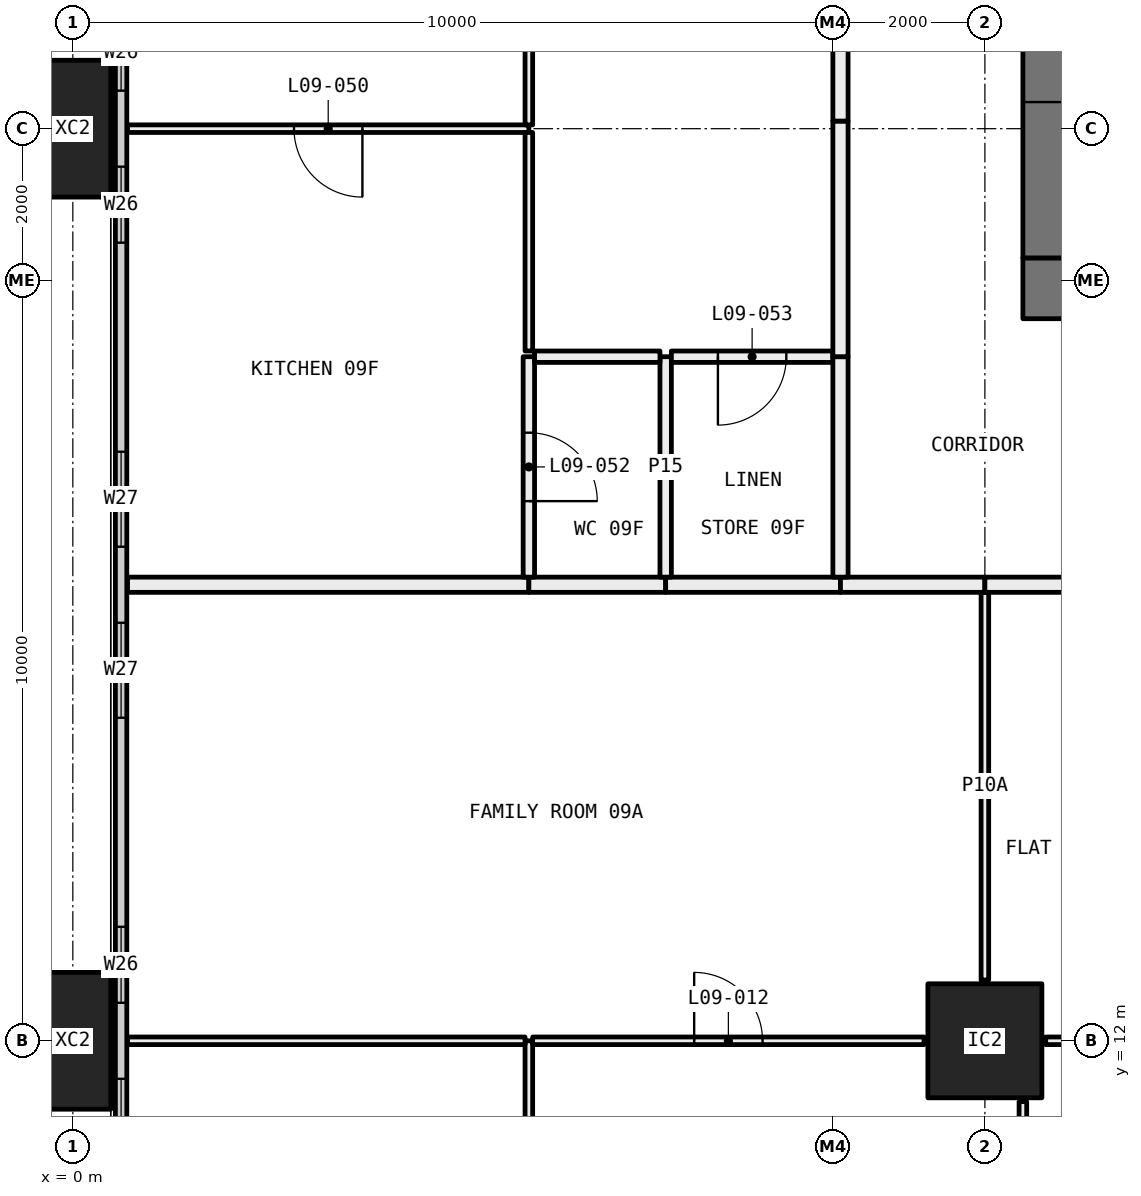
"""IFC4 building model, lengths in metres.
Left out: names, types, materials, properties, quantities, classifications, styles, units other than length and angle.
Written with IfcOpenShell. Run it as: python <this file> out.ifc"""

import sys

from ifc_helpers import new_model, si_unit, direction, frame, frame_2d, origin, origin_2d, place, context, subcontext, project, spatial, rectangle, hollow_rectangle, extrude, element, fill, save


model = new_model("IFC4")
c1 = context("Model", 3, precision=1e-05, world=origin(), true_north=direction((0.0, 1.0)))
c2 = subcontext(c1, "Body", "Model", "MODEL_VIEW")
j1 = project(units=[si_unit("LENGTHUNIT", "METRE"), si_unit("PLANEANGLEUNIT", "RADIAN")], contexts=[c1])
p1 = place(None, origin())
s1 = spatial("IfcSite", under=j1, at=p1, CompositionType="ELEMENT")
p2 = place(p1, origin())
s2 = spatial("IfcBuilding", under=s1, at=p2, CompositionType="ELEMENT")
p3 = place(p2, frame((0.0, 0.0, 43.8)))
s3 = spatial("IfcBuildingStorey", under=s2, at=p3, CompositionType="ELEMENT", Elevation=43.8)
for number, where, z_axis, x_axis in (
    (1, (0.0, 12.0, -0.4), (0.0, 0.0, 1.0), (0.0, 1.0, 0.0)),
    (2, (0.0, 24.0, -0.4), (0.0, 0.0, 1.0), (0.0, 1.0, 0.0)),
):
    element("IfcColumn", number, at=place(p3, frame(where, z_axis=z_axis, x_axis=x_axis)), inside=s3, PredefinedType="COLUMN", context=c2, shape_type="SweptSolid", body=[
        extrude(hollow_rectangle(XDim=1.8, YDim=1.0, WallThickness=0.07, at=origin_2d()), origin(), (0.0, 0.0, 1.0), 3.45),
    ])
p4 = place(p3, frame((12.0, 12.0, 0.0), z_axis=(0.0, 0.0, 1.0), x_axis=(1.0, 0.0, 0.0)))
e3 = element("IfcColumn", 3, at=p4, inside=s3, PredefinedType="COLUMN", context=c2, shape_type="SweptSolid", body=[
    extrude(hollow_rectangle(XDim=1.5, YDim=1.5, WallThickness=0.065, at=origin_2d()), origin(), (0.0, 0.0, 1.0), 3.05),
])
p5 = place(p3, frame((0.635, 6.71, 0.0), z_axis=(0.0, 0.0, 1.0), x_axis=(0.0, 1.0, 0.0)))
e4 = element("IfcWall", 4, at=p5, inside=s3, PredefinedType="ELEMENTEDWALL", context=c2, shape_type="SweptSolid", body=[
    extrude(rectangle(XDim=34.58, YDim=0.15, at=frame_2d((17.29, 0.0))), origin(), (0.0, 0.0, 1.0), 3.05),
])
p6 = place(p5, frame((0.29, 0.0, 0.45)))
e5 = element("IfcOpeningElement", 5, at=p6, cuts=e4, PredefinedType="OPENING", context=c2, shape_type="SweptSolid", body=[
    extrude(rectangle(XDim=4.5, YDim=2.55, at=frame_2d((2.25, 1.275))), frame((0.0, 0.085, 0.0), z_axis=(0.0, -1.0, 0.0), x_axis=(1.0, 0.0, 0.0)), (0.0, 0.0, 1.0), 0.17),
])
p7 = place(p5, frame((5.79, 0.0, 0.45)))
e6 = element("IfcOpeningElement", 6, at=p7, cuts=e4, PredefinedType="OPENING", context=c2, shape_type="SweptSolid", body=[
    extrude(rectangle(XDim=1.0, YDim=2.55, at=frame_2d((0.5, 1.275))), frame((0.0, 0.085, 0.0), z_axis=(0.0, -1.0, 0.0), x_axis=(1.0, 0.0, 0.0)), (0.0, 0.0, 1.0), 0.17),
])
p8 = place(p5, frame((9.54, 0.0, 0.45)))
e7 = element("IfcOpeningElement", 7, at=p8, cuts=e4, PredefinedType="OPENING", context=c2, shape_type="SweptSolid", body=[
    extrude(rectangle(XDim=1.25, YDim=2.55, at=frame_2d((0.625, 1.275))), frame((0.0, 0.085, 0.0), z_axis=(0.0, -1.0, 0.0), x_axis=(1.0, 0.0, 0.0)), (0.0, 0.0, 1.0), 0.17),
])
p9 = place(p5, frame((11.79, 0.0, 0.45)))
e8 = element("IfcOpeningElement", 8, at=p9, cuts=e4, PredefinedType="OPENING", context=c2, shape_type="SweptSolid", body=[
    extrude(rectangle(XDim=1.25, YDim=2.55, at=frame_2d((0.625, 1.275))), frame((0.0, 0.085, 0.0), z_axis=(0.0, -1.0, 0.0), x_axis=(1.0, 0.0, 0.0)), (0.0, 0.0, 1.0), 0.17),
])
p10 = place(p5, frame((15.79, 0.0, 0.45)))
e9 = element("IfcOpeningElement", 9, at=p10, cuts=e4, PredefinedType="OPENING", context=c2, shape_type="SweptSolid", body=[
    extrude(rectangle(XDim=1.0, YDim=2.55, at=frame_2d((0.5, 1.275))), frame((0.0, 0.085, 0.0), z_axis=(0.0, -1.0, 0.0), x_axis=(1.0, 0.0, 0.0)), (0.0, 0.0, 1.0), 0.17),
])
p11 = place(p5, frame((17.79, 0.0, 0.45)))
e10 = element("IfcOpeningElement", 10, at=p11, cuts=e4, PredefinedType="OPENING", context=c2, shape_type="SweptSolid", body=[
    extrude(rectangle(XDim=1.0, YDim=2.55, at=frame_2d((0.5, 1.275))), frame((0.0, 0.085, 0.0), z_axis=(0.0, -1.0, 0.0), x_axis=(1.0, 0.0, 0.0)), (0.0, 0.0, 1.0), 0.17),
])
p12 = place(p5, frame((21.54, 0.0, 0.45)))
e11 = element("IfcOpeningElement", 11, at=p12, cuts=e4, PredefinedType="OPENING", context=c2, shape_type="SweptSolid", body=[
    extrude(rectangle(XDim=1.25, YDim=2.55, at=frame_2d((0.625, 1.275))), frame((0.0, 0.085, 0.0), z_axis=(0.0, -1.0, 0.0), x_axis=(1.0, 0.0, 0.0)), (0.0, 0.0, 1.0), 0.17),
])
p13 = place(p5, frame((23.79, 0.0, 0.45)))
e12 = element("IfcOpeningElement", 12, at=p13, cuts=e4, PredefinedType="OPENING", context=c2, shape_type="SweptSolid", body=[
    extrude(rectangle(XDim=1.25, YDim=2.55, at=frame_2d((0.625, 1.275))), frame((0.0, 0.085, 0.0), z_axis=(0.0, -1.0, 0.0), x_axis=(1.0, 0.0, 0.0)), (0.0, 0.0, 1.0), 0.17),
])
p14 = place(p5, frame((27.79, 0.0, 0.45)))
e13 = element("IfcOpeningElement", 13, at=p14, cuts=e4, PredefinedType="OPENING", context=c2, shape_type="SweptSolid", body=[
    extrude(rectangle(XDim=1.0, YDim=2.55, at=frame_2d((0.5, 1.275))), frame((0.0, 0.085, 0.0), z_axis=(0.0, -1.0, 0.0), x_axis=(1.0, 0.0, 0.0)), (0.0, 0.0, 1.0), 0.17),
])
p15 = place(p5, frame((29.79, 0.0, 0.45)))
e14 = element("IfcOpeningElement", 14, at=p15, cuts=e4, PredefinedType="OPENING", context=c2, shape_type="SweptSolid", body=[
    extrude(rectangle(XDim=4.5, YDim=2.55, at=frame_2d((2.25, 1.275))), frame((0.0, 0.085, 0.0), z_axis=(0.0, -1.0, 0.0), x_axis=(1.0, 0.0, 0.0)), (0.0, 0.0, 1.0), 0.17),
])
p16 = place(p3, frame((6.0, 6.72, 0.0), z_axis=(0.0, 0.0, 1.0), x_axis=(0.0, 1.0, 0.0)))
e15 = element("IfcWall", 15, at=p16, inside=s3, PredefinedType="PARTITIONING", context=c2, shape_type="SweptSolid", body=[
    extrude(rectangle(XDim=5.28, YDim=0.1, at=frame_2d((2.64, 0.0))), origin(), (0.0, 0.0, 1.0), 2.45),
])
p17 = place(p16, frame((2.19, 0.0, 0.0)))
e16 = element("IfcOpeningElement", 16, at=p17, cuts=e15, PredefinedType="OPENING", context=c2, shape_type="SweptSolid", body=[
    extrude(rectangle(XDim=0.9, YDim=2.1, at=frame_2d((0.45, 1.05))), frame((0.0, 0.06, 0.0), z_axis=(0.0, -1.0, 0.0), x_axis=(1.0, 0.0, 0.0)), (0.0, 0.0, 1.0), 0.12),
])
p18 = place(p3, frame((5.95, 12.0, 0.0), z_axis=(0.0, 0.0, 1.0), x_axis=(-1.0, 0.0, 0.0)))
e17 = element("IfcWall", 17, at=p18, inside=s3, PredefinedType="PARTITIONING", context=c2, shape_type="SweptSolid", body=[
    extrude(rectangle(XDim=5.23, YDim=0.1, at=frame_2d((2.615, 0.0))), origin(), (0.0, 0.0, 1.0), 2.45),
])
p19 = place(p3, frame((12.5, 6.05, 0.0), z_axis=(0.0, 0.0, 1.0), x_axis=(0.0, 1.0, 0.0)))
e18 = element("IfcWall", 18, at=p19, inside=s3, PredefinedType="PARTITIONING", context=c2, shape_type="SweptSolid", body=[
    extrude(rectangle(XDim=5.15, YDim=0.1, at=frame_2d((2.575, 0.0))), origin(), (0.0, 0.0, 1.0), 3.05),
])
p20 = place(p19, frame((2.125, 0.0, 0.0)))
e19 = element("IfcOpeningElement", 19, at=p20, cuts=e18, PredefinedType="OPENING", context=c2, shape_type="SweptSolid", body=[
    extrude(rectangle(XDim=0.9, YDim=2.1, at=frame_2d((0.45, 1.05))), frame((0.0, 0.06, 0.0), z_axis=(0.0, -1.0, 0.0), x_axis=(1.0, 0.0, 0.0)), (0.0, 0.0, 1.0), 0.12),
])
p21 = place(p3, frame((11.2, 12.0, 0.0), z_axis=(0.0, 0.0, 1.0), x_axis=(-1.0, 0.0, 0.0)))
e20 = element("IfcWall", 20, at=p21, inside=s3, PredefinedType="PARTITIONING", context=c2, shape_type="SweptSolid", body=[
    extrude(rectangle(XDim=5.15, YDim=0.1, at=frame_2d((2.575, 0.0))), origin(), (0.0, 0.0, 1.0), 2.45),
])
p22 = place(p21, frame((2.125, 0.0, 0.0)))
e21 = element("IfcOpeningElement", 21, at=p22, cuts=e20, PredefinedType="OPENING", context=c2, shape_type="SweptSolid", body=[
    extrude(rectangle(XDim=0.9, YDim=2.1, at=frame_2d((0.45, 1.05))), frame((0.0, 0.06, 0.0), z_axis=(0.0, -1.0, 0.0), x_axis=(1.0, 0.0, 0.0)), (0.0, 0.0, 1.0), 0.12),
])
p23 = place(p3, frame((16.5, 12.0, 0.0), z_axis=(0.0, 0.0, 1.0), x_axis=(-1.0, 0.0, 0.0)))
e22 = element("IfcWall", 22, at=p23, inside=s3, PredefinedType="PARTITIONING", context=c2, shape_type="SweptSolid", body=[
    extrude(rectangle(XDim=3.7, YDim=0.1, at=frame_2d((1.85, 0.0))), origin(), (0.0, 0.0, 1.0), 2.45),
])
p24 = place(p23, frame((1.4, 0.0, 0.0)))
e23 = element("IfcOpeningElement", 23, at=p24, cuts=e22, PredefinedType="OPENING", context=c2, shape_type="SweptSolid", body=[
    extrude(rectangle(XDim=0.9, YDim=2.1, at=frame_2d((0.45, 1.05))), frame((0.0, 0.06, 0.0), z_axis=(0.0, -1.0, 0.0), x_axis=(1.0, 0.0, 0.0)), (0.0, 0.0, 1.0), 0.12),
])
p25 = place(p3, frame((12.0, 12.8, 0.0), z_axis=(0.0, 0.0, 1.0), x_axis=(0.0, 1.0, 0.0)))
e24 = element("IfcWall", 24, at=p25, inside=s3, PredefinedType="PARTITIONING", context=c2, shape_type="SweptSolid", body=[
    extrude(rectangle(XDim=5.1, YDim=0.1, at=frame_2d((2.55, 0.0))), origin(), (0.0, 0.0, 1.0), 3.05),
])
p26 = place(p3, frame((6.0, 18.0, 0.0), z_axis=(0.0, 0.0, 1.0), x_axis=(-1.0, 0.0, 0.0)))
e25 = element("IfcWall", 25, at=p26, inside=s3, PredefinedType="PARTITIONING", context=c2, shape_type="SweptSolid", body=[
    extrude(rectangle(XDim=5.28, YDim=0.2, at=frame_2d((2.64, 0.0))), origin(), (0.0, 0.0, 1.0), 3.05),
])
p27 = place(p3, frame((7.8, 18.0, 0.0), z_axis=(0.0, 0.0, 1.0), x_axis=(-1.0, 0.0, 0.0)))
e26 = element("IfcWall", 26, at=p27, inside=s3, PredefinedType="PARTITIONING", context=c2, shape_type="SweptSolid", body=[
    extrude(rectangle(XDim=1.8, YDim=0.2, at=frame_2d((0.9, 0.0))), origin(), (0.0, 0.0, 1.0), 3.05),
])
p28 = place(p3, frame((10.1, 18.0, 0.0), z_axis=(0.0, 0.0, 1.0), x_axis=(-1.0, 0.0, 0.0)))
e27 = element("IfcWall", 27, at=p28, inside=s3, PredefinedType="PARTITIONING", context=c2, shape_type="SweptSolid", body=[
    extrude(rectangle(XDim=2.3, YDim=0.2, at=frame_2d((1.15, 0.0))), origin(), (0.0, 0.0, 1.0), 3.05),
])
p29 = place(p3, frame((12.0, 18.0, 0.0), z_axis=(0.0, 0.0, 1.0), x_axis=(-1.0, 0.0, 0.0)))
e28 = element("IfcWall", 28, at=p29, inside=s3, PredefinedType="PARTITIONING", context=c2, shape_type="SweptSolid", body=[
    extrude(rectangle(XDim=1.9, YDim=0.2, at=frame_2d((0.95, 0.0))), origin(), (0.0, 0.0, 1.0), 3.05),
])
p30 = place(p3, frame((16.5, 18.0, 0.0), z_axis=(0.0, 0.0, 1.0), x_axis=(-1.0, 0.0, 0.0)))
e29 = element("IfcWall", 29, at=p30, inside=s3, PredefinedType="PARTITIONING", context=c2, shape_type="SweptSolid", body=[
    extrude(rectangle(XDim=4.5, YDim=0.2, at=frame_2d((2.25, 0.0))), origin(), (0.0, 0.0, 1.0), 3.05),
])
p31 = place(p30, frame((1.75, 0.0, 0.0)))
e30 = element("IfcOpeningElement", 30, at=p31, cuts=e29, PredefinedType="OPENING", context=c2, shape_type="SweptSolid", body=[
    extrude(rectangle(XDim=1.0, YDim=2.1, at=frame_2d((0.5, 1.05))), frame((0.0, 0.11, 0.0), z_axis=(0.0, -1.0, 0.0), x_axis=(1.0, 0.0, 0.0)), (0.0, 0.0, 1.0), 0.22),
])
p32 = place(p3, frame((6.0, 24.0, 0.0), z_axis=(0.0, 0.0, 1.0), x_axis=(-1.0, 0.0, 0.0)))
e31 = element("IfcWall", 31, at=p32, inside=s3, PredefinedType="PARTITIONING", context=c2, shape_type="SweptSolid", body=[
    extrude(rectangle(XDim=5.28, YDim=0.1, at=frame_2d((2.64, 0.0))), origin(), (0.0, 0.0, 1.0), 2.45),
])
p33 = place(p32, frame((2.19, 0.0, 0.0)))
e32 = element("IfcOpeningElement", 32, at=p33, cuts=e31, PredefinedType="OPENING", context=c2, shape_type="SweptSolid", body=[
    extrude(rectangle(XDim=0.9, YDim=2.1, at=frame_2d((0.45, 1.05))), frame((0.0, 0.06, 0.0), z_axis=(0.0, -1.0, 0.0), x_axis=(1.0, 0.0, 0.0)), (0.0, 0.0, 1.0), 0.12),
])
p34 = place(p3, frame((6.0, 18.1, 0.0), z_axis=(0.0, 0.0, 1.0), x_axis=(0.0, 1.0, 0.0)))
e33 = element("IfcWall", 33, at=p34, inside=s3, PredefinedType="PARTITIONING", context=c2, shape_type="SweptSolid", body=[
    extrude(rectangle(XDim=2.9, YDim=0.15, at=frame_2d((1.45, 0.0))), origin(), (0.0, 0.0, 1.0), 3.05),
])
p35 = place(p34, frame((1.0, 0.0, 0.0)))
e34 = element("IfcOpeningElement", 34, at=p35, cuts=e33, PredefinedType="OPENING", context=c2, shape_type="SweptSolid", body=[
    extrude(rectangle(XDim=0.9, YDim=2.1, at=frame_2d((0.45, 1.05))), frame((0.0, 0.085, 0.0), z_axis=(0.0, -1.0, 0.0), x_axis=(1.0, 0.0, 0.0)), (0.0, 0.0, 1.0), 0.17),
])
p36 = place(p3, frame((6.0, 21.075, 0.0), z_axis=(0.0, 0.0, 1.0), x_axis=(0.0, 1.0, 0.0)))
e35 = element("IfcWall", 35, at=p36, inside=s3, PredefinedType="PARTITIONING", context=c2, shape_type="SweptSolid", body=[
    extrude(rectangle(XDim=2.875, YDim=0.1, at=frame_2d((1.438, 0.0))), origin(), (0.0, 0.0, 1.0), 2.45),
])
p37 = place(p3, frame((6.0, 24.05, 0.0), z_axis=(0.0, 0.0, 1.0), x_axis=(0.0, 1.0, 0.0)))
e36 = element("IfcWall", 36, at=p37, inside=s3, PredefinedType="PARTITIONING", context=c2, shape_type="SweptSolid", body=[
    extrude(rectangle(XDim=8.95, YDim=0.1, at=frame_2d((4.475, 0.0))), origin(), (0.0, 0.0, 1.0), 2.45),
])
p38 = place(p3, frame((7.8, 18.1, 0.0), z_axis=(0.0, 0.0, 1.0), x_axis=(0.0, 1.0, 0.0)))
e37 = element("IfcWall", 37, at=p38, inside=s3, PredefinedType="PARTITIONING", context=c2, shape_type="SweptSolid", body=[
    extrude(rectangle(XDim=2.9, YDim=0.15, at=frame_2d((1.45, 0.0))), origin(), (0.0, 0.0, 1.0), 3.05),
])
p39 = place(p3, frame((7.725, 21.0, 0.0), z_axis=(0.0, 0.0, 1.0), x_axis=(-1.0, 0.0, 0.0)))
e38 = element("IfcWall", 38, at=p39, inside=s3, PredefinedType="PARTITIONING", context=c2, shape_type="SweptSolid", body=[
    extrude(rectangle(XDim=1.65, YDim=0.15, at=frame_2d((0.825, 0.0))), origin(), (0.0, 0.0, 1.0), 3.05),
])
p40 = place(p3, frame((10.0, 21.0, 0.0), z_axis=(0.0, 0.0, 1.0), x_axis=(-1.0, 0.0, 0.0)))
e39 = element("IfcWall", 39, at=p40, inside=s3, PredefinedType="PARTITIONING", context=c2, shape_type="SweptSolid", body=[
    extrude(rectangle(XDim=2.125, YDim=0.15, at=frame_2d((1.062, 0.0))), origin(), (0.0, 0.0, 1.0), 3.05),
])
p41 = place(p40, frame((0.613, 0.0, 0.0)))
e40 = element("IfcOpeningElement", 40, at=p41, cuts=e39, PredefinedType="OPENING", context=c2, shape_type="SweptSolid", body=[
    extrude(rectangle(XDim=0.9, YDim=2.1, at=frame_2d((0.45, 1.05))), frame((0.0, 0.085, 0.0), z_axis=(0.0, -1.0, 0.0), x_axis=(1.0, 0.0, 0.0)), (0.0, 0.0, 1.0), 0.17),
])
p42 = place(p3, frame((10.1, 18.1, 0.0), z_axis=(0.0, 0.0, 1.0), x_axis=(0.0, 1.0, 0.0)))
e41 = element("IfcWall", 41, at=p42, inside=s3, PredefinedType="PARTITIONING", context=c2, shape_type="SweptSolid", body=[
    extrude(rectangle(XDim=2.9, YDim=0.2, at=frame_2d((1.45, 0.0))), origin(), (0.0, 0.0, 1.0), 3.05),
])
p43 = place(p3, frame((10.1, 21.0, 0.0), z_axis=(0.0, 0.0, 1.0), x_axis=(0.0, 1.0, 0.0)))
e42 = element("IfcWall", 42, at=p43, inside=s3, PredefinedType="PARTITIONING", context=c2, shape_type="SweptSolid", body=[
    extrude(rectangle(XDim=3.1, YDim=0.2, at=frame_2d((1.55, 0.0))), origin(), (0.0, 0.0, 1.0), 2.45),
])
p44 = place(p3, frame((10.1, 24.1, 0.0), z_axis=(0.0, 0.0, 1.0), x_axis=(0.0, 1.0, 0.0)))
e43 = element("IfcWall", 43, at=p44, inside=s3, PredefinedType="PARTITIONING", context=c2, shape_type="SweptSolid", body=[
    extrude(rectangle(XDim=8.9, YDim=0.2, at=frame_2d((4.45, 0.0))), origin(), (0.0, 0.0, 1.0), 3.05),
])
p45 = place(p3, frame((12.5, 21.9, 0.0), z_axis=(0.0, 0.0, 1.0), x_axis=(1.0, 0.0, 0.0)))
e44 = element("IfcWall", 44, at=p45, inside=s3, PredefinedType="SHEAR", context=c2, shape_type="SweptSolid", body=[
    extrude(rectangle(XDim=11.0, YDim=0.8, at=frame_2d((5.5, 0.0))), origin(), (0.0, 0.0, 1.0), 3.05),
])
p46 = place(p3, frame((12.9, 22.3, 0.0), z_axis=(0.0, 0.0, 1.0), x_axis=(0.0, 1.0, 0.0)))
e45 = element("IfcWall", 45, at=p46, inside=s3, PredefinedType="SHEAR", context=c2, shape_type="SweptSolid", body=[
    extrude(rectangle(XDim=15.4, YDim=0.8, at=frame_2d((7.7, 0.0))), origin(), (0.0, 0.0, 1.0), 3.05),
])
p47 = place(p46, frame((8.15, 0.0, 0.0)))
e46 = element("IfcOpeningElement", 46, at=p47, cuts=e45, PredefinedType="OPENING", context=c2, shape_type="SweptSolid", body=[
    extrude(rectangle(XDim=1.6, YDim=2.1, at=frame_2d((0.8, 1.05))), frame((0.0, 0.41, 0.0), z_axis=(0.0, -1.0, 0.0), x_axis=(1.0, 0.0, 0.0)), (0.0, 0.0, 1.0), 0.82),
])
p48 = place(p46, frame((2.05, 0.0, 0.0)))
e47 = element("IfcOpeningElement", 47, at=p48, cuts=e45, PredefinedType="OPENING", context=c2, shape_type="SweptSolid", body=[
    extrude(rectangle(XDim=1.0, YDim=2.1, at=frame_2d((0.5, 1.05))), frame((0.0, 0.41, 0.0), z_axis=(0.0, -1.0, 0.0), x_axis=(1.0, 0.0, 0.0)), (0.0, 0.0, 1.0), 0.82),
])
p49 = place(p6, origin())
e48 = element("IfcWindow", 48, at=p49, inside=s3, PartitioningType="SINGLE_PANEL", PredefinedType="WINDOW", context=c2, shape_type="SweptSolid", body=[
    extrude(rectangle(XDim=4.5, YDim=2.55, at=frame_2d((2.25, 1.275))), frame((0.0, 0.03, 0.0), z_axis=(0.0, -1.0, 0.0), x_axis=(1.0, 0.0, 0.0)), (0.0, 0.0, 1.0), 0.06),
])
fill(e5, e48)
p50 = place(p7, origin())
e49 = element("IfcWindow", 49, at=p50, inside=s3, PartitioningType="SINGLE_PANEL", PredefinedType="WINDOW", context=c2, shape_type="SweptSolid", body=[
    extrude(rectangle(XDim=1.0, YDim=2.55, at=frame_2d((0.5, 1.275))), frame((0.0, 0.03, 0.0), z_axis=(0.0, -1.0, 0.0), x_axis=(1.0, 0.0, 0.0)), (0.0, 0.0, 1.0), 0.06),
])
fill(e6, e49)
p51 = place(p8, origin())
e50 = element("IfcWindow", 50, at=p51, inside=s3, PartitioningType="SINGLE_PANEL", PredefinedType="WINDOW", context=c2, shape_type="SweptSolid", body=[
    extrude(rectangle(XDim=1.25, YDim=2.55, at=frame_2d((0.625, 1.275))), frame((0.0, 0.03, 0.0), z_axis=(0.0, -1.0, 0.0), x_axis=(1.0, 0.0, 0.0)), (0.0, 0.0, 1.0), 0.06),
])
fill(e7, e50)
p52 = place(p9, origin())
e51 = element("IfcWindow", 51, at=p52, inside=s3, PartitioningType="SINGLE_PANEL", PredefinedType="WINDOW", context=c2, shape_type="SweptSolid", body=[
    extrude(rectangle(XDim=1.25, YDim=2.55, at=frame_2d((0.625, 1.275))), frame((0.0, 0.03, 0.0), z_axis=(0.0, -1.0, 0.0), x_axis=(1.0, 0.0, 0.0)), (0.0, 0.0, 1.0), 0.06),
])
fill(e8, e51)
p53 = place(p10, origin())
e52 = element("IfcWindow", 52, at=p53, inside=s3, PartitioningType="SINGLE_PANEL", PredefinedType="WINDOW", context=c2, shape_type="SweptSolid", body=[
    extrude(rectangle(XDim=1.0, YDim=2.55, at=frame_2d((0.5, 1.275))), frame((0.0, 0.03, 0.0), z_axis=(0.0, -1.0, 0.0), x_axis=(1.0, 0.0, 0.0)), (0.0, 0.0, 1.0), 0.06),
])
fill(e9, e52)
p54 = place(p11, origin())
e53 = element("IfcWindow", 53, at=p54, inside=s3, PartitioningType="SINGLE_PANEL", PredefinedType="WINDOW", context=c2, shape_type="SweptSolid", body=[
    extrude(rectangle(XDim=1.0, YDim=2.55, at=frame_2d((0.5, 1.275))), frame((0.0, 0.03, 0.0), z_axis=(0.0, -1.0, 0.0), x_axis=(1.0, 0.0, 0.0)), (0.0, 0.0, 1.0), 0.06),
])
fill(e10, e53)
p55 = place(p22, frame((0.9, 0.0, 0.0), x_axis=(-1.0, 0.0, 0.0)))
e54 = element("IfcDoor", 54, at=p55, inside=s3, OperationType="SINGLE_SWING_RIGHT", PredefinedType="DOOR", context=c2, shape_type="SweptSolid", body=[
    extrude(rectangle(XDim=0.9, YDim=2.1, at=frame_2d((0.45, 1.05))), frame((0.0, 0.025, 0.0), z_axis=(0.0, -1.0, 0.0), x_axis=(1.0, 0.0, 0.0)), (0.0, 0.0, 1.0), 0.05),
])
fill(e21, e54)
p56 = place(p33, origin())
e55 = element("IfcDoor", 55, at=p56, inside=s3, OperationType="SINGLE_SWING_RIGHT", PredefinedType="DOOR", context=c2, shape_type="SweptSolid", body=[
    extrude(rectangle(XDim=0.9, YDim=2.1, at=frame_2d((0.45, 1.05))), frame((0.0, 0.025, 0.0), z_axis=(0.0, -1.0, 0.0), x_axis=(1.0, 0.0, 0.0)), (0.0, 0.0, 1.0), 0.05),
])
fill(e32, e55)
p57 = place(p35, frame((0.9, 0.0, 0.0), x_axis=(-1.0, 0.0, 0.0)))
e56 = element("IfcDoor", 56, at=p57, inside=s3, OperationType="SINGLE_SWING_LEFT", PredefinedType="DOOR", context=c2, shape_type="SweptSolid", body=[
    extrude(rectangle(XDim=0.9, YDim=2.1, at=frame_2d((0.45, 1.05))), frame((0.0, 0.025, 0.0), z_axis=(0.0, -1.0, 0.0), x_axis=(1.0, 0.0, 0.0)), (0.0, 0.0, 1.0), 0.05),
])
fill(e34, e56)
p58 = place(p41, origin())
e57 = element("IfcDoor", 57, at=p58, inside=s3, OperationType="SINGLE_SWING_LEFT", PredefinedType="DOOR", context=c2, shape_type="SweptSolid", body=[
    extrude(rectangle(XDim=0.9, YDim=2.1, at=frame_2d((0.45, 1.05))), frame((0.0, 0.025, 0.0), z_axis=(0.0, -1.0, 0.0), x_axis=(1.0, 0.0, 0.0)), (0.0, 0.0, 1.0), 0.05),
])
fill(e40, e57)
p59 = place(p48, frame((1.0, 0.0, 0.0), x_axis=(-1.0, 0.0, 0.0)))
e58 = element("IfcDoor", 58, at=p59, inside=s3, OperationType="SINGLE_SWING_RIGHT", PredefinedType="DOOR", context=c2, shape_type="SweptSolid", body=[
    extrude(rectangle(XDim=1.0, YDim=2.1, at=frame_2d((0.5, 1.05))), frame((0.0, 0.025, 0.0), z_axis=(0.0, -1.0, 0.0), x_axis=(1.0, 0.0, 0.0)), (0.0, 0.0, 1.0), 0.05),
])
fill(e47, e58)
save(model, sys.argv[1])
